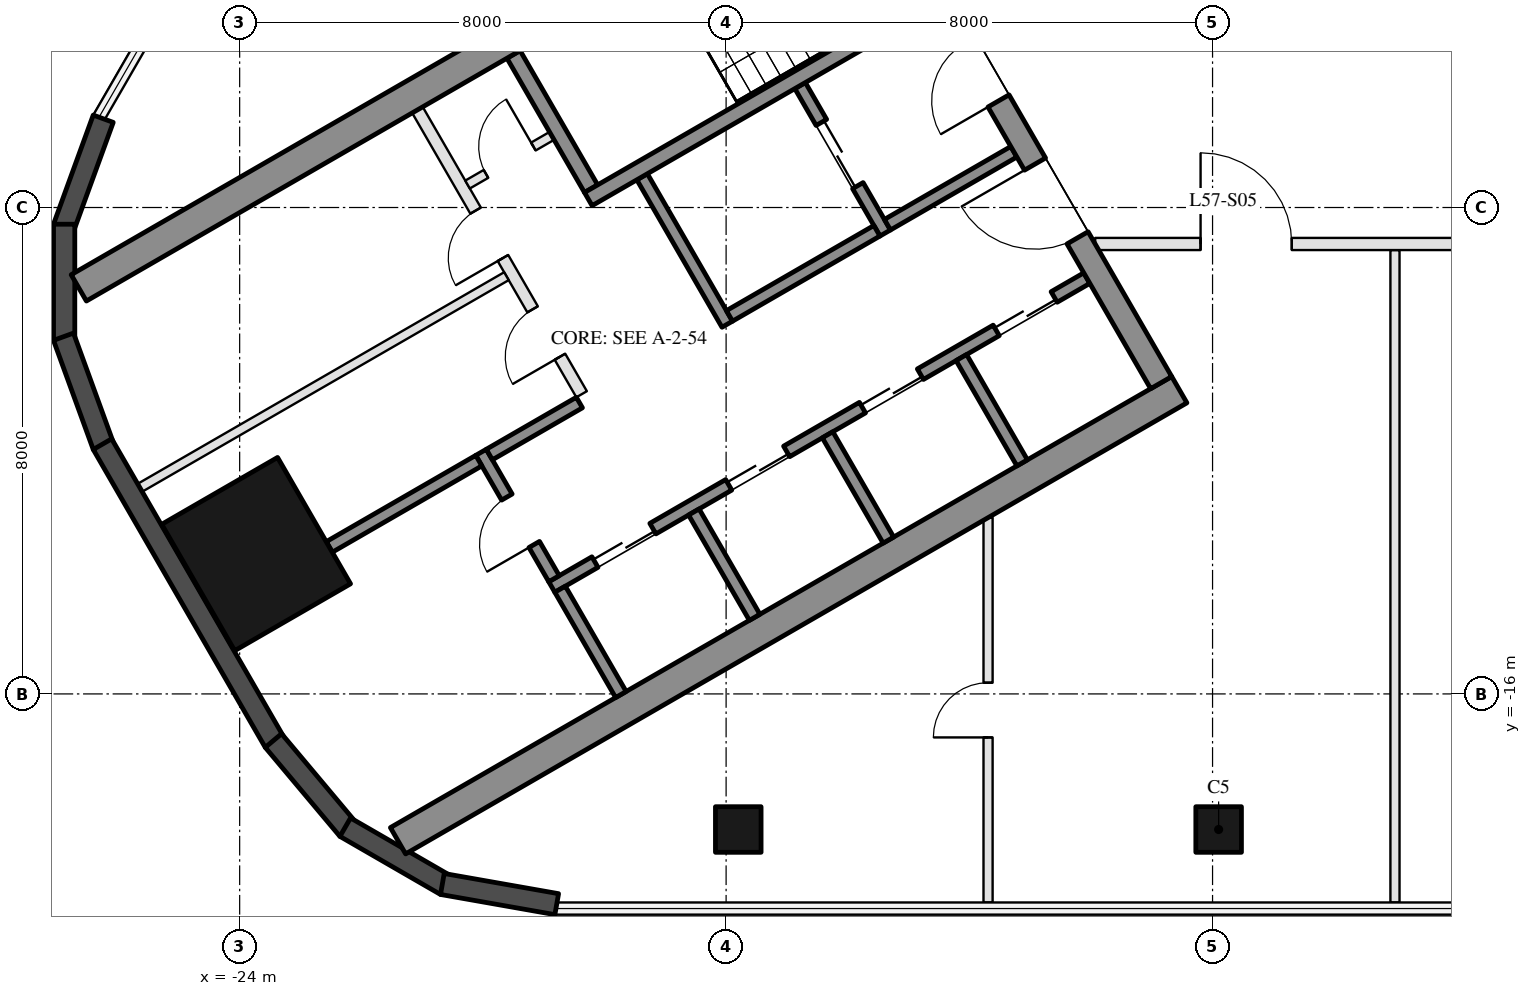
"""IFC4 building model, lengths in metres.
Left out: names, types, materials, properties, quantities, classifications, styles, units other than length and angle.
Written with IfcOpenShell. Run it as: python <this file> out.ifc"""

import sys

from ifc_helpers import new_model, si_unit, direction, frame, frame_2d, origin, origin_2d, place, context, subcontext, project, spatial, rectangle, hollow_rectangle, extrude, element, fill, save


model = new_model("IFC4")
c1 = context("Model", 3, precision=1e-05, world=origin(), true_north=direction((0.0, 1.0)))
c2 = subcontext(c1, "Body", "Model", "MODEL_VIEW")
j1 = project(units=[si_unit("LENGTHUNIT", "METRE"), si_unit("PLANEANGLEUNIT", "RADIAN")], contexts=[c1])
p1 = place(None, origin())
s1 = spatial("IfcSite", under=j1, at=p1, CompositionType="ELEMENT")
p2 = place(p1, origin())
s2 = spatial("IfcBuilding", under=s1, at=p2, CompositionType="ELEMENT")
p3 = place(p2, frame((0.0, 0.0, 231.7)))
s3 = spatial("IfcBuildingStorey", under=s2, at=p3, CompositionType="ELEMENT", Elevation=231.7)
for number, where, z_axis, x_axis in (
    (1, (-15.8, -18.23, 0.0), (0.0, 0.0, 1.0), (-1.0, 0.0, 0.0)),
    (2, (-7.9, -18.23, 0.0), (0.0, 0.0, 1.0), (-1.0, 0.0, 0.0)),
):
    element("IfcColumn", number, at=place(p3, frame(where, z_axis=z_axis, x_axis=x_axis)), inside=s3, PredefinedType="COLUMN", context=c2, shape_type="SweptSolid", body=[
        extrude(hollow_rectangle(XDim=0.75, YDim=0.75, WallThickness=0.035, at=origin_2d()), origin(), (0.0, 0.0, 1.0), 6.0),
    ])
p4 = place(p3, frame((-23.729, -13.7, 0.0), z_axis=(0.0, 0.0, 1.0), x_axis=(-0.5, 0.866025403784, 0.0)))
e3 = element("IfcColumn", 3, at=p4, inside=s3, PredefinedType="COLUMN", context=c2, shape_type="SweptSolid", body=[
    extrude(hollow_rectangle(XDim=2.4, YDim=2.2, WallThickness=0.06, at=origin_2d()), origin(), (0.0, 0.0, 1.0), 6.0),
])
for number, where, z_axis, x_axis in (
    (4, (-26.244, -6.54, 0.0), (0.0, 0.0, 1.0), (-0.342, -0.94, 0.0)),
    (5, (-26.886, -8.275, 0.0), (0.0, 0.0, 1.0), (0.0, -1.0, 0.0)),
    (6, (-26.897, -10.125, 0.0), (0.0, 0.0, 1.0), (0.342, -0.94, 0.0)),
):
    element("IfcWall", number, at=place(p3, frame(where, z_axis=z_axis, x_axis=x_axis)), inside=s3, PredefinedType="SOLIDWALL", context=c2, shape_type="SweptSolid", body=[
        extrude(rectangle(XDim=1.91, YDim=0.35, at=frame_2d((0.955, 0.0))), origin(), (0.0, 0.0, 1.0), 5.7),
    ])
p5 = place(p3, frame((-26.256, -11.893, 0.0), z_axis=(0.0, 0.0, 1.0), x_axis=(0.499986410639, -0.866033249463, 0.0)))
e7 = element("IfcWall", 7, at=p5, inside=s3, PredefinedType="SOLIDWALL", context=c2, shape_type="SweptSolid", body=[
    extrude(rectangle(XDim=5.658, YDim=0.35, at=frame_2d((2.829, 0.0))), origin(), (0.0, 0.0, 1.0), 5.7),
])
for number, where, z_axis, x_axis in (
    (8, (-23.445, -16.768, 0.0), (0.0, 0.0, 1.0), (0.643, -0.766, 0.0)),
    (9, (-22.264, -18.192, 0.0), (0.0, 0.0, 1.0), (0.866, -0.5, 0.0)),
):
    element("IfcWall", number, at=place(p3, frame(where, z_axis=z_axis, x_axis=x_axis)), inside=s3, PredefinedType="SOLIDWALL", context=c2, shape_type="SweptSolid", body=[
        extrude(rectangle(XDim=1.91, YDim=0.35, at=frame_2d((0.955, 0.0))), origin(), (0.0, 0.0, 1.0), 5.7),
    ])
p6 = place(p3, frame((-20.667, -19.126, 0.0), z_axis=(0.0, 0.0, 1.0), x_axis=(0.984798995425, -0.173697837091, 0.0)))
e10 = element("IfcWall", 10, at=p6, inside=s3, PredefinedType="SOLIDWALL", context=c2, shape_type="SweptSolid", body=[
    extrude(rectangle(XDim=1.91, YDim=0.35, at=frame_2d((0.955, 0.0))), origin(), (0.0, 0.0, 1.0), 5.7),
])
p7 = place(p3, frame((-8.547, -10.997, 0.0), z_axis=(0.0, 0.0, 1.0), x_axis=(-0.866025009528, -0.500000682871, 0.0)))
e11 = element("IfcWall", 11, at=p7, inside=s3, PredefinedType="SHEAR", context=c2, shape_type="SweptSolid", body=[
    extrude(rectangle(XDim=14.837, YDim=0.5, at=frame_2d((7.418, 0.0))), origin(), (0.0, 0.0, 1.0), 5.7),
])
p8 = place(p3, frame((-19.496, -5.482, 0.0), z_axis=(0.0, 0.0, 1.0), x_axis=(0.499990435942, -0.866030925526, 0.0)))
e12 = element("IfcWall", 12, at=p8, inside=s3, PredefinedType="SHEAR", context=c2, shape_type="SweptSolid", body=[
    extrude(rectangle(XDim=2.55, YDim=0.25, at=frame_2d((1.275, 0.0))), origin(), (0.0, 0.0, 1.0), 5.7),
])
p9 = place(p3, frame((-17.381, -7.495, 0.0), z_axis=(0.0, 0.0, 1.0), x_axis=(0.500011755427, -0.866018616679, 0.0)))
e13 = element("IfcWall", 13, at=p9, inside=s3, PredefinedType="SHEAR", context=c2, shape_type="SweptSolid", body=[
    extrude(rectangle(XDim=2.8, YDim=0.2, at=frame_2d((1.4, 0.0))), origin(), (0.0, 0.0, 1.0), 5.7),
])
p10 = place(p3, frame((-14.783, -5.995, 0.0), z_axis=(0.0, 0.0, 1.0), x_axis=(0.49994636267, -0.866056369097, 0.0)))
e14 = element("IfcWall", 14, at=p10, inside=s3, PredefinedType="SHEAR", context=c2, shape_type="SweptSolid", body=[
    extrude(rectangle(XDim=2.8, YDim=0.2, at=frame_2d((1.4, 0.0))), origin(), (0.0, 0.0, 1.0), 5.7),
])
p11 = place(p10, frame((0.7, 0.0, 0.0)))
e15 = element("IfcOpeningElement", 15, at=p11, cuts=e14, PredefinedType="OPENING", context=c2, shape_type="SweptSolid", body=[
    extrude(rectangle(XDim=1.2, YDim=2.1, at=frame_2d((0.6, 1.05))), frame((0.0, 0.11, 0.0), z_axis=(0.0, -1.0, 0.0), x_axis=(1.0, 0.0, 0.0)), (0.0, 0.0, 1.0), 0.22),
])
p12 = place(p3, frame((-13.52, -8.383, 0.0), z_axis=(0.0, 0.0, 1.0), x_axis=(-0.866034573852, -0.49998411664, 0.0)))
e16 = element("IfcWall", 16, at=p12, inside=s3, PredefinedType="SHEAR", context=c2, shape_type="SweptSolid", body=[
    extrude(rectangle(XDim=2.8, YDim=0.2, at=frame_2d((1.4, 0.0))), origin(), (0.0, 0.0, 1.0), 5.7),
])
p13 = place(p3, frame((-11.268, -7.083, 0.0), z_axis=(0.0, 0.0, 1.0), x_axis=(-0.866050077142, -0.499957262057, 0.0)))
e17 = element("IfcWall", 17, at=p13, inside=s3, PredefinedType="SHEAR", context=c2, shape_type="SweptSolid", body=[
    extrude(rectangle(XDim=2.4, YDim=0.2, at=frame_2d((1.2, 0.0))), origin(), (0.0, 0.0, 1.0), 5.7),
])
p14 = place(p3, frame((-10.068, -9.162, 0.0), z_axis=(0.0, 0.0, 1.0), x_axis=(-0.866032725843, -0.499987317609, 0.0)))
e18 = element("IfcWall", 18, at=p14, inside=s3, PredefinedType="SHEAR", context=c2, shape_type="SweptSolid", body=[
    extrude(rectangle(XDim=10.16, YDim=0.2, at=frame_2d((5.08, 0.0))), origin(), (0.0, 0.0, 1.0), 5.7),
])
p15 = place(p14, frame((0.62, 0.0, 0.0)))
e19 = element("IfcOpeningElement", 19, at=p15, cuts=e18, PredefinedType="OPENING", context=c2, shape_type="SweptSolid", body=[
    extrude(rectangle(XDim=1.1, YDim=2.1, at=frame_2d((0.55, 1.05))), frame((0.0, 0.11, 0.0), z_axis=(0.0, -1.0, 0.0), x_axis=(1.0, 0.0, 0.0)), (0.0, 0.0, 1.0), 0.22),
])
p16 = place(p14, frame((3.16, 0.0, 0.0)))
e20 = element("IfcOpeningElement", 20, at=p16, cuts=e18, PredefinedType="OPENING", context=c2, shape_type="SweptSolid", body=[
    extrude(rectangle(XDim=1.1, YDim=2.1, at=frame_2d((0.55, 1.05))), frame((0.0, 0.11, 0.0), z_axis=(0.0, -1.0, 0.0), x_axis=(1.0, 0.0, 0.0)), (0.0, 0.0, 1.0), 0.22),
])
p17 = place(p14, frame((5.7, 0.0, 0.0)))
e21 = element("IfcOpeningElement", 21, at=p17, cuts=e18, PredefinedType="OPENING", context=c2, shape_type="SweptSolid", body=[
    extrude(rectangle(XDim=1.1, YDim=2.1, at=frame_2d((0.55, 1.05))), frame((0.0, 0.11, 0.0), z_axis=(0.0, -1.0, 0.0), x_axis=(1.0, 0.0, 0.0)), (0.0, 0.0, 1.0), 0.22),
])
p18 = place(p14, frame((8.24, 0.0, 0.0)))
e22 = element("IfcOpeningElement", 22, at=p18, cuts=e18, PredefinedType="OPENING", context=c2, shape_type="SweptSolid", body=[
    extrude(rectangle(XDim=1.1, YDim=2.1, at=frame_2d((0.55, 1.05))), frame((0.0, 0.11, 0.0), z_axis=(0.0, -1.0, 0.0), x_axis=(1.0, 0.0, 0.0)), (0.0, 0.0, 1.0), 0.22),
])
p19 = place(p3, frame((-20.031, -12.026, 0.0), z_axis=(0.0, 0.0, 1.0), x_axis=(0.500033551112, -0.866006032174, 0.0)))
e23 = element("IfcWall", 23, at=p19, inside=s3, PredefinedType="SHEAR", context=c2, shape_type="SweptSolid", body=[
    extrude(rectangle(XDim=2.4, YDim=0.2, at=frame_2d((1.2, 0.0))), origin(), (0.0, 0.0, 1.0), 5.7),
])
p20 = place(p19, frame((0.85, 0.0, 0.0)))
e24 = element("IfcOpeningElement", 24, at=p20, cuts=e23, PredefinedType="OPENING", context=c2, shape_type="SweptSolid", body=[
    extrude(rectangle(XDim=0.9, YDim=2.1, at=frame_2d((0.45, 1.05))), frame((0.0, 0.11, 0.0), z_axis=(0.0, -1.0, 0.0), x_axis=(1.0, 0.0, 0.0)), (0.0, 0.0, 1.0), 0.22),
])
p21 = place(p3, frame((-18.413, -11.208, 0.0), z_axis=(0.0, 0.0, 1.0), x_axis=(-0.866038183914, -0.499977863513, 0.0)))
e25 = element("IfcWall", 25, at=p21, inside=s3, PredefinedType="SHEAR", context=c2, shape_type="SweptSolid", body=[
    extrude(rectangle(XDim=1.71, YDim=0.2, at=frame_2d((0.855, 0.0))), origin(), (0.0, 0.0, 1.0), 5.7),
])
for number, where, z_axis, x_axis in (
    (26, (-12.131, -10.468, 0.0), (0.0, 0.0, 1.0), (0.5, -0.866, 0.0)),
    (27, (-14.331, -11.738, 0.0), (0.0, 0.0, 1.0), (0.5, -0.866, 0.0)),
    (28, (-16.531, -13.008, 0.0), (0.0, 0.0, 1.0), (0.5, -0.866, 0.0)),
    (29, (-18.73, -14.278, 0.0), (0.0, 0.0, 1.0), (0.5, -0.866, 0.0)),
):
    element("IfcWall", number, at=place(p3, frame(where, z_axis=z_axis, x_axis=x_axis)), inside=s3, PredefinedType="SHEAR", context=c2, shape_type="SweptSolid", body=[
        extrude(rectangle(XDim=2.0, YDim=0.2, at=frame_2d((1.0, 0.0))), origin(), (0.0, 0.0, 1.0), 5.7),
    ])
p22 = place(p3, frame((-20.067, -12.163, 0.0), z_axis=(0.0, 0.0, 1.0), x_axis=(-0.866055327414, -0.49994816717, 0.0)))
e30 = element("IfcWall", 30, at=p22, inside=s3, PredefinedType="SHEAR", context=c2, shape_type="SweptSolid", body=[
    extrude(rectangle(XDim=2.84, YDim=0.2, at=frame_2d((1.42, 0.0))), origin(), (0.0, 0.0, 1.0), 5.7),
])
p23 = place(p3, frame((-21.076, -6.395, 0.0), z_axis=(0.0, 0.0, 1.0), x_axis=(0.50001468107, -0.866016927499, 0.0)))
e31 = element("IfcWall", 31, at=p23, inside=s3, PredefinedType="PARTITIONING", context=c2, shape_type="SweptSolid", body=[
    extrude(rectangle(XDim=5.4, YDim=0.2, at=frame_2d((2.7, 0.0))), origin(), (0.0, 0.0, 1.0), 5.7),
])
p24 = place(p23, frame((1.913, 0.0, 0.0)))
e32 = element("IfcOpeningElement", 32, at=p24, cuts=e31, PredefinedType="OPENING", context=c2, shape_type="SweptSolid", body=[
    extrude(rectangle(XDim=0.9, YDim=2.1, at=frame_2d((0.45, 1.05))), frame((0.0, 0.11, 0.0), z_axis=(0.0, -1.0, 0.0), x_axis=(1.0, 0.0, 0.0)), (0.0, 0.0, 1.0), 0.22),
])
p25 = place(p23, frame((3.788, 0.0, 0.0)))
e33 = element("IfcOpeningElement", 33, at=p25, cuts=e31, PredefinedType="OPENING", context=c2, shape_type="SweptSolid", body=[
    extrude(rectangle(XDim=0.9, YDim=2.1, at=frame_2d((0.45, 1.05))), frame((0.0, 0.11, 0.0), z_axis=(0.0, -1.0, 0.0), x_axis=(1.0, 0.0, 0.0)), (0.0, 0.0, 1.0), 0.22),
])
p26 = place(p3, frame((-18.866, -6.822, 0.0), z_axis=(0.0, 0.0, 1.0), x_axis=(-0.866028054938, -0.499995408039, 0.0)))
e34 = element("IfcWall", 34, at=p26, inside=s3, PredefinedType="PARTITIONING", context=c2, shape_type="SweptSolid", body=[
    extrude(rectangle(XDim=1.6, YDim=0.15, at=frame_2d((0.8, 0.0))), origin(), (0.0, 0.0, 1.0), 5.7),
])
p27 = place(p26, frame((0.35, 0.0, 0.0)))
e35 = element("IfcOpeningElement", 35, at=p27, cuts=e34, PredefinedType="OPENING", context=c2, shape_type="SweptSolid", body=[
    extrude(rectangle(XDim=0.9, YDim=2.1, at=frame_2d((0.45, 1.05))), frame((0.0, 0.085, 0.0), z_axis=(0.0, -1.0, 0.0), x_axis=(1.0, 0.0, 0.0)), (0.0, 0.0, 1.0), 0.17),
])
p28 = place(p3, frame((-19.613, -9.13, 0.0), z_axis=(0.0, 0.0, 1.0), x_axis=(-0.866031734426, -0.499989034847, 0.0)))
e36 = element("IfcWall", 36, at=p28, inside=s3, PredefinedType="PARTITIONING", context=c2, shape_type="SweptSolid", body=[
    extrude(rectangle(XDim=6.95, YDim=0.15, at=frame_2d((3.475, 0.0))), origin(), (0.0, 0.0, 1.0), 5.7),
])
p29 = place(p3, frame((-15.274, -2.756, 0.0), z_axis=(0.0, 0.0, 1.0), x_axis=(-0.86602396135, -0.500002498361, 0.0)))
e37 = element("IfcWall", 37, at=p29, inside=s3, PredefinedType="SHEAR", context=c2, shape_type="SweptSolid", body=[
    extrude(rectangle(XDim=13.131, YDim=0.5, at=frame_2d((6.565, 0.0))), origin(), (0.0, 0.0, 1.0), 5.7),
])
p30 = place(p3, frame((-12.57, -4.428, 0.0), z_axis=(0.0, 0.0, 1.0), x_axis=(0.499984378957, -0.86603442241, 0.0)))
e38 = element("IfcWall", 38, at=p30, inside=s3, PredefinedType="SHEAR", context=c2, shape_type="SweptSolid", body=[
    extrude(rectangle(XDim=7.45, YDim=0.4, at=frame_2d((3.725, 0.0))), origin(), (0.0, 0.0, 1.0), 5.7),
])
p31 = place(p30, frame((1.0, 0.0, 0.0)))
e39 = element("IfcOpeningElement", 39, at=p31, cuts=e38, PredefinedType="OPENING", context=c2, shape_type="SweptSolid", body=[
    extrude(rectangle(XDim=1.1, YDim=2.1, at=frame_2d((0.55, 1.05))), frame((0.0, 0.21, 0.0), z_axis=(0.0, -1.0, 0.0), x_axis=(1.0, 0.0, 0.0)), (0.0, 0.0, 1.0), 0.42),
])
p32 = place(p30, frame((3.3, 0.0, 0.0)))
e40 = element("IfcOpeningElement", 40, at=p32, cuts=e38, PredefinedType="OPENING", context=c2, shape_type="SweptSolid", body=[
    extrude(rectangle(XDim=1.4, YDim=2.1, at=frame_2d((0.7, 1.05))), frame((0.0, 0.21, 0.0), z_axis=(0.0, -1.0, 0.0), x_axis=(1.0, 0.0, 0.0)), (0.0, 0.0, 1.0), 0.42),
])
p33 = place(p3, frame((-13.812, -5.29, 0.0), z_axis=(0.0, 0.0, 1.0), x_axis=(-0.866023561601, -0.500003190742, 0.0)))
e41 = element("IfcWall", 41, at=p33, inside=s3, PredefinedType="SHEAR", context=c2, shape_type="SweptSolid", body=[
    extrude(rectangle(XDim=5.144, YDim=0.25, at=frame_2d((2.572, 0.0))), origin(), (0.0, 0.0, 1.0), 5.7),
])
p34 = place(p3, frame((-11.692, -19.43, 0.0), z_axis=(0.0, 0.0, 1.0), x_axis=(0.0, 1.0, 0.0)))
e42 = element("IfcWall", 42, at=p34, inside=s3, PredefinedType="PARTITIONING", context=c2, shape_type="SweptSolid", body=[
    extrude(rectangle(XDim=6.329, YDim=0.15, at=frame_2d((3.165, 0.0))), origin(), (0.0, 0.0, 1.0), 5.7),
])
p35 = place(p34, frame((2.714, 0.0, 0.0)))
e43 = element("IfcOpeningElement", 43, at=p35, cuts=e42, PredefinedType="OPENING", context=c2, shape_type="SweptSolid", body=[
    extrude(rectangle(XDim=0.9, YDim=2.1, at=frame_2d((0.45, 1.05))), frame((0.0, 0.085, 0.0), z_axis=(0.0, -1.0, 0.0), x_axis=(1.0, 0.0, 0.0)), (0.0, 0.0, 1.0), 0.17),
])
p36 = place(p3, frame((-5.0, -19.43, 0.0), z_axis=(0.0, 0.0, 1.0), x_axis=(0.0, 1.0, 0.0)))
e44 = element("IfcWall", 44, at=p36, inside=s3, PredefinedType="PARTITIONING", context=c2, shape_type="SweptSolid", body=[
    extrude(rectangle(XDim=10.73, YDim=0.15, at=frame_2d((5.365, 0.0))), origin(), (0.0, 0.0, 1.0), 5.7),
])
p37 = place(p3, frame((-9.93, -8.6, 0.0), z_axis=(0.0, 0.0, 1.0), x_axis=(1.0, 0.0, 0.0)))
e45 = element("IfcWall", 45, at=p37, inside=s3, PredefinedType="PARTITIONING", context=c2, shape_type="SweptSolid", body=[
    extrude(rectangle(XDim=19.861, YDim=0.2, at=frame_2d((9.93, 0.0))), origin(), (0.0, 0.0, 1.0), 4.91),
])
p38 = place(p37, frame((1.734, 0.0, 0.0)))
e46 = element("IfcOpeningElement", 46, at=p38, cuts=e45, PredefinedType="OPENING", context=c2, shape_type="SweptSolid", body=[
    extrude(rectangle(XDim=1.5, YDim=2.1, at=frame_2d((0.75, 1.05))), frame((0.0, 0.11, 0.0), z_axis=(0.0, -1.0, 0.0), x_axis=(1.0, 0.0, 0.0)), (0.0, 0.0, 1.0), 0.22),
])
p39 = place(p37, frame((6.637, 0.0, 0.0)))
e47 = element("IfcOpeningElement", 47, at=p39, cuts=e45, PredefinedType="OPENING", context=c2, shape_type="SweptSolid", body=[
    extrude(rectangle(XDim=1.8, YDim=2.4, at=frame_2d((0.9, 1.2))), frame((0.0, 0.11, 0.0), z_axis=(0.0, -1.0, 0.0), x_axis=(1.0, 0.0, 0.0)), (0.0, 0.0, 1.0), 0.22),
])
p40 = place(p37, frame((11.924, 0.0, 0.0)))
e48 = element("IfcOpeningElement", 48, at=p40, cuts=e45, PredefinedType="OPENING", context=c2, shape_type="SweptSolid", body=[
    extrude(rectangle(XDim=1.8, YDim=2.4, at=frame_2d((0.9, 1.2))), frame((0.0, 0.11, 0.0), z_axis=(0.0, -1.0, 0.0), x_axis=(1.0, 0.0, 0.0)), (0.0, 0.0, 1.0), 0.22),
])
p41 = place(p37, frame((17.028, 0.0, 0.0)))
e49 = element("IfcOpeningElement", 49, at=p41, cuts=e45, PredefinedType="OPENING", context=c2, shape_type="SweptSolid", body=[
    extrude(rectangle(XDim=1.2, YDim=2.1, at=frame_2d((0.6, 1.05))), frame((0.0, 0.11, 0.0), z_axis=(0.0, -1.0, 0.0), x_axis=(1.0, 0.0, 0.0)), (0.0, 0.0, 1.0), 0.22),
])
p42 = place(p11, origin())
e50 = element("IfcDoor", 50, at=p42, inside=s3, OperationType="DOUBLE_DOOR_SLIDING", PredefinedType="DOOR", context=c2, shape_type="SweptSolid", body=[
    extrude(rectangle(XDim=1.2, YDim=2.1, at=frame_2d((0.6, 1.05))), frame((0.0, 0.025, 0.0), z_axis=(0.0, -1.0, 0.0), x_axis=(1.0, 0.0, 0.0)), (0.0, 0.0, 1.0), 0.05),
])
fill(e15, e50)
p43 = place(p27, frame((0.9, 0.0, 0.0), z_axis=(0.0, 0.0, 1.0), x_axis=(-1.0, 0.0, 0.0)))
e51 = element("IfcDoor", 51, at=p43, inside=s3, OperationType="SINGLE_SWING_RIGHT", PredefinedType="DOOR", context=c2, shape_type="SweptSolid", body=[
    extrude(rectangle(XDim=0.9, YDim=2.1, at=frame_2d((0.45, 1.05))), frame((0.0, 0.025, 0.0), z_axis=(0.0, -1.0, 0.0), x_axis=(1.0, 0.0, 0.0)), (0.0, 0.0, 1.0), 0.05),
])
fill(e35, e51)
p44 = place(p15, origin())
e52 = element("IfcDoor", 52, at=p44, inside=s3, OperationType="DOUBLE_DOOR_SLIDING", PredefinedType="DOOR", context=c2, shape_type="SweptSolid", body=[
    extrude(rectangle(XDim=1.1, YDim=2.1, at=frame_2d((0.55, 1.05))), frame((0.0, 0.025, 0.0), z_axis=(0.0, -1.0, 0.0), x_axis=(1.0, 0.0, 0.0)), (0.0, 0.0, 1.0), 0.05),
])
fill(e19, e52)
p45 = place(p16, origin())
e53 = element("IfcDoor", 53, at=p45, inside=s3, OperationType="DOUBLE_DOOR_SLIDING", PredefinedType="DOOR", context=c2, shape_type="SweptSolid", body=[
    extrude(rectangle(XDim=1.1, YDim=2.1, at=frame_2d((0.55, 1.05))), frame((0.0, 0.025, 0.0), z_axis=(0.0, -1.0, 0.0), x_axis=(1.0, 0.0, 0.0)), (0.0, 0.0, 1.0), 0.05),
])
fill(e20, e53)
p46 = place(p17, origin())
e54 = element("IfcDoor", 54, at=p46, inside=s3, OperationType="DOUBLE_DOOR_SLIDING", PredefinedType="DOOR", context=c2, shape_type="SweptSolid", body=[
    extrude(rectangle(XDim=1.1, YDim=2.1, at=frame_2d((0.55, 1.05))), frame((0.0, 0.025, 0.0), z_axis=(0.0, -1.0, 0.0), x_axis=(1.0, 0.0, 0.0)), (0.0, 0.0, 1.0), 0.05),
])
fill(e21, e54)
p47 = place(p18, origin())
e55 = element("IfcDoor", 55, at=p47, inside=s3, OperationType="DOUBLE_DOOR_SLIDING", PredefinedType="DOOR", context=c2, shape_type="SweptSolid", body=[
    extrude(rectangle(XDim=1.1, YDim=2.1, at=frame_2d((0.55, 1.05))), frame((0.0, 0.025, 0.0), z_axis=(0.0, -1.0, 0.0), x_axis=(1.0, 0.0, 0.0)), (0.0, 0.0, 1.0), 0.05),
])
fill(e22, e55)
p48 = place(p20, frame((0.9, 0.0, 0.0), z_axis=(0.0, 0.0, 1.0), x_axis=(-1.0, 0.0, 0.0)))
e56 = element("IfcDoor", 56, at=p48, inside=s3, OperationType="SINGLE_SWING_LEFT", PredefinedType="DOOR", context=c2, shape_type="SweptSolid", body=[
    extrude(rectangle(XDim=0.9, YDim=2.1, at=frame_2d((0.45, 1.05))), frame((0.0, 0.025, 0.0), z_axis=(0.0, -1.0, 0.0), x_axis=(1.0, 0.0, 0.0)), (0.0, 0.0, 1.0), 0.05),
])
fill(e24, e56)
p49 = place(p24, frame((0.9, 0.0, 0.0), z_axis=(0.0, 0.0, 1.0), x_axis=(-1.0, 0.0, 0.0)))
e57 = element("IfcDoor", 57, at=p49, inside=s3, OperationType="SINGLE_SWING_LEFT", PredefinedType="DOOR", context=c2, shape_type="SweptSolid", body=[
    extrude(rectangle(XDim=0.9, YDim=2.1, at=frame_2d((0.45, 1.05))), frame((0.0, 0.025, 0.0), z_axis=(0.0, -1.0, 0.0), x_axis=(1.0, 0.0, 0.0)), (0.0, 0.0, 1.0), 0.05),
])
fill(e32, e57)
p50 = place(p25, frame((0.9, 0.0, 0.0), z_axis=(0.0, 0.0, 1.0), x_axis=(-1.0, 0.0, 0.0)))
e58 = element("IfcDoor", 58, at=p50, inside=s3, OperationType="SINGLE_SWING_LEFT", PredefinedType="DOOR", context=c2, shape_type="SweptSolid", body=[
    extrude(rectangle(XDim=0.9, YDim=2.1, at=frame_2d((0.45, 1.05))), frame((0.0, 0.025, 0.0), z_axis=(0.0, -1.0, 0.0), x_axis=(1.0, 0.0, 0.0)), (0.0, 0.0, 1.0), 0.05),
])
fill(e33, e58)
p51 = place(p31, frame((1.1, 0.0, 0.0), z_axis=(0.0, 0.0, 1.0), x_axis=(-1.0, 0.0, 0.0)))
e59 = element("IfcDoor", 59, at=p51, inside=s3, OperationType="SINGLE_SWING_LEFT", PredefinedType="DOOR", context=c2, shape_type="SweptSolid", body=[
    extrude(rectangle(XDim=1.1, YDim=2.1, at=frame_2d((0.55, 1.05))), frame((0.0, 0.025, 0.0), z_axis=(0.0, -1.0, 0.0), x_axis=(1.0, 0.0, 0.0)), (0.0, 0.0, 1.0), 0.05),
])
fill(e39, e59)
p52 = place(p32, frame((1.4, 0.0, 0.0), z_axis=(0.0, 0.0, 1.0), x_axis=(-1.0, 0.0, 0.0)))
e60 = element("IfcDoor", 60, at=p52, inside=s3, OperationType="DOUBLE_DOOR_SINGLE_SWING", PredefinedType="DOOR", context=c2, shape_type="SweptSolid", body=[
    extrude(rectangle(XDim=1.4, YDim=2.1, at=frame_2d((0.7, 1.05))), frame((0.0, 0.025, 0.0), z_axis=(0.0, -1.0, 0.0), x_axis=(1.0, 0.0, 0.0)), (0.0, 0.0, 1.0), 0.05),
])
fill(e40, e60)
p53 = place(p38, origin())
e61 = element("IfcDoor", 61, at=p53, inside=s3, OperationType="DOUBLE_DOOR_SINGLE_SWING", PredefinedType="DOOR", context=c2, shape_type="SweptSolid", body=[
    extrude(rectangle(XDim=1.5, YDim=2.1, at=frame_2d((0.75, 1.05))), frame((0.0, 0.025, 0.0), z_axis=(0.0, -1.0, 0.0), x_axis=(1.0, 0.0, 0.0)), (0.0, 0.0, 1.0), 0.05),
])
fill(e46, e61)
p54 = place(p35, origin())
e62 = element("IfcDoor", 62, at=p54, inside=s3, OperationType="SINGLE_SWING_LEFT", PredefinedType="DOOR", context=c2, shape_type="SweptSolid", body=[
    extrude(rectangle(XDim=0.9, YDim=2.1, at=frame_2d((0.45, 1.05))), frame((0.0, 0.025, 0.0), z_axis=(0.0, -1.0, 0.0), x_axis=(1.0, 0.0, 0.0)), (0.0, 0.0, 1.0), 0.05),
])
fill(e43, e62)
save(model, sys.argv[1])
